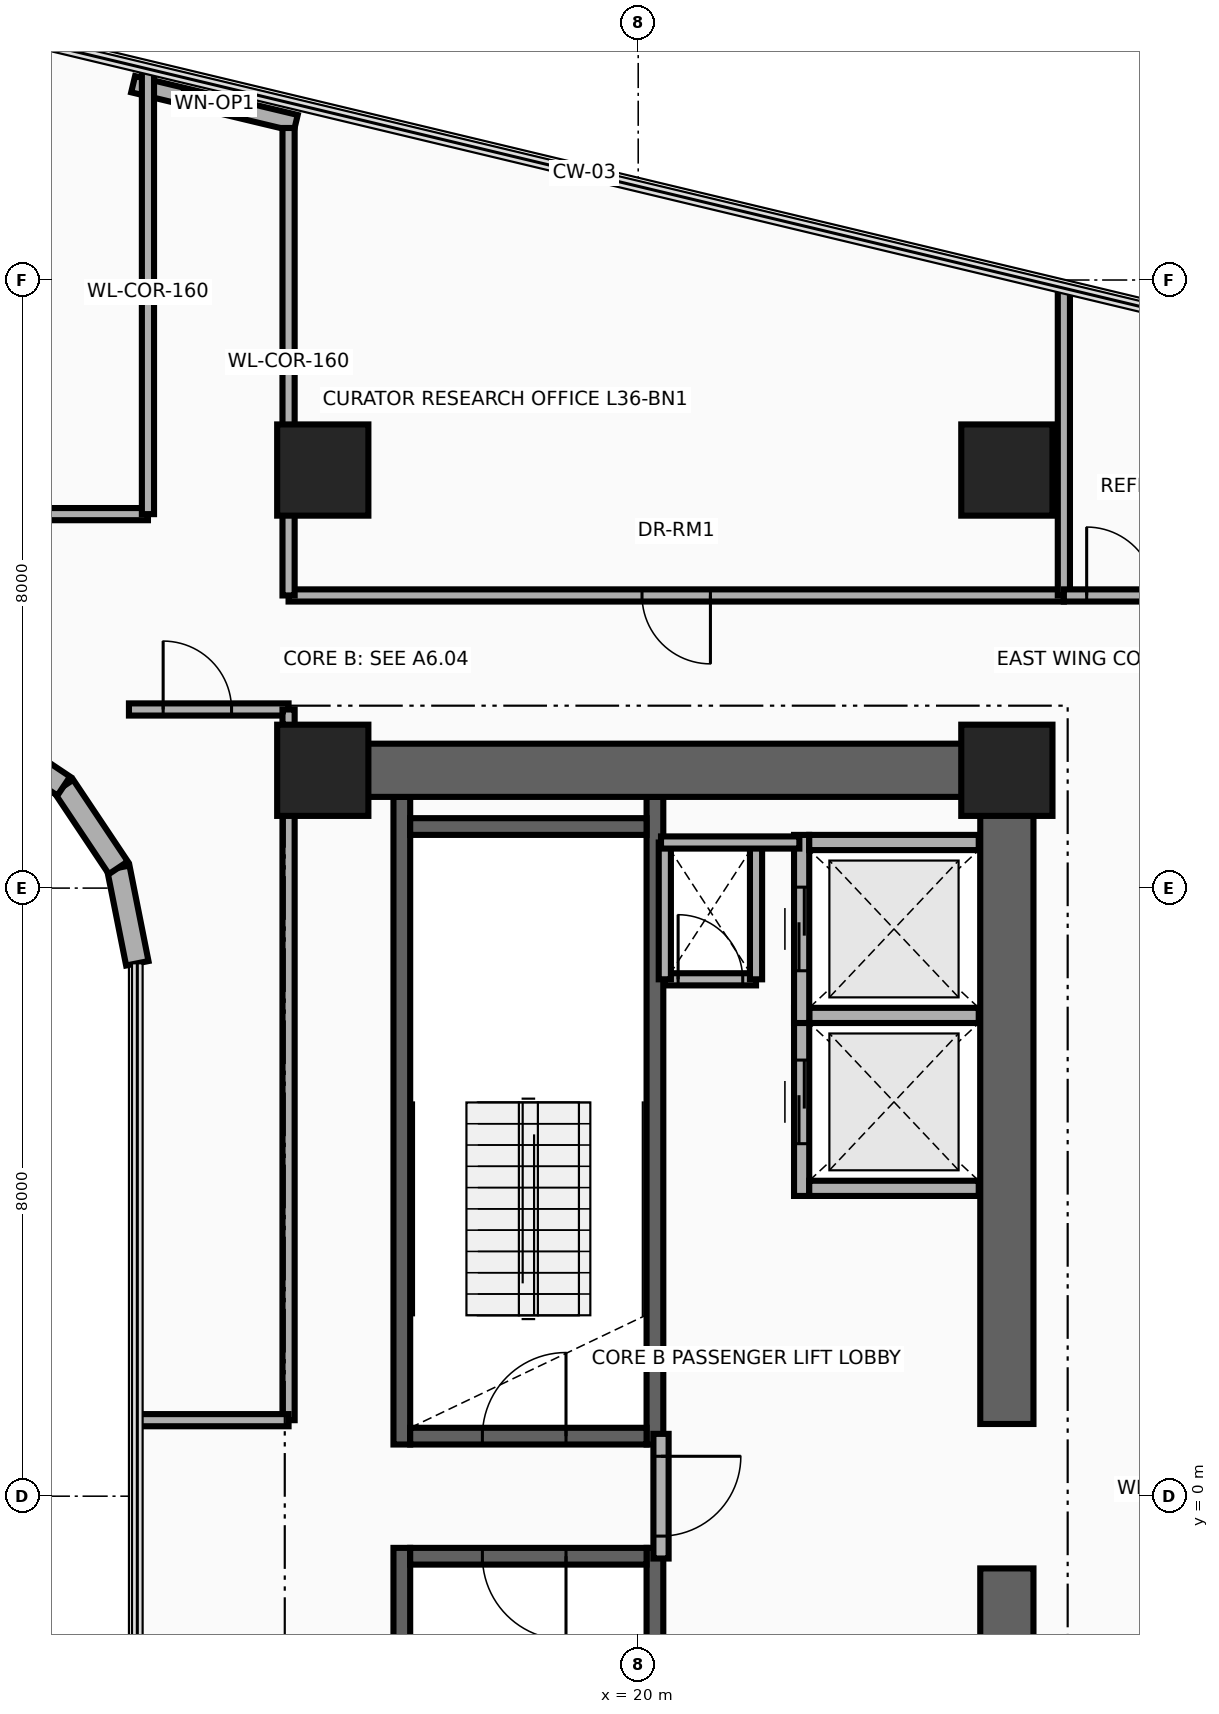
"""IFC4 building model, lengths in metres.
Left out: names, types, materials, properties, quantities, classifications, styles, units other than length and angle.
Written with IfcOpenShell. Run it as: python <this file> out.ifc"""

import sys

from ifc_helpers import new_model, si_unit, direction, frame, frame_2d, origin, origin_2d, place, context, subcontext, project, spatial, rectangle, extrude, source, transform, mapped, element, fill, save


model = new_model("IFC4")
c1 = context("Model", 3, precision=1e-05, world=origin(), true_north=direction((0.0, 1.0)))
c2 = subcontext(c1, "Body", "Model", "MODEL_VIEW")
j1 = project(units=[si_unit("LENGTHUNIT", "METRE"), si_unit("PLANEANGLEUNIT", "RADIAN")], contexts=[c1])
p1 = place(None, origin())
s1 = spatial("IfcSite", under=j1, at=p1, CompositionType="ELEMENT")
p2 = place(p1, origin())
s2 = spatial("IfcBuilding", under=s1, at=p2, CompositionType="ELEMENT")
p3 = place(p2, frame((0.0, 0.0, 142.7)))
s3 = spatial("IfcBuildingStorey", under=s2, at=p3, CompositionType="ELEMENT", Elevation=142.7)
for number, where, z_axis, x_axis in (
    (1, (16.89, 0.68, 0.0), (0.0, 0.0, 1.0), (0.0, 1.0, 0.0)),
    (2, (20.22, 0.68, 0.0), (0.0, 0.0, 1.0), (0.0, 1.0, 0.0)),
):
    element("IfcWall", number, at=place(p3, frame(where, z_axis=z_axis, x_axis=x_axis)), inside=s3, PredefinedType="SHEAR", context=c2, shape_type="SweptSolid", body=[
        extrude(rectangle(XDim=8.52, YDim=0.22, at=frame_2d((4.26, 0.0))), origin(), (0.0, 0.0, 1.0), 3.46),
    ])
p4 = place(p3, frame((17.0, 0.79, 0.0), z_axis=(0.0, 0.0, 1.0), x_axis=(1.0, 0.0, 0.0)))
e3 = element("IfcWall", 3, at=p4, inside=s3, PredefinedType="SHEAR", context=c2, shape_type="SweptSolid", body=[
    extrude(rectangle(XDim=3.11, YDim=0.22, at=frame_2d((1.555, 0.0))), origin(), (0.0, 0.0, 1.0), 3.46),
])
p5 = place(p4, frame((0.95, 0.0, 0.0)))
e4 = element("IfcOpeningElement", 4, at=p5, cuts=e3, PredefinedType="OPENING", context=c2, shape_type="SweptSolid", body=[
    extrude(rectangle(XDim=1.1, YDim=2.15, at=frame_2d((0.55, 1.075))), frame((0.0, 0.125, 0.0), z_axis=(0.0, -1.0, 0.0), x_axis=(1.0, 0.0, 0.0)), (0.0, 0.0, 1.0), 0.25),
])
p6 = place(p3, frame((17.0, 8.81, 0.0), z_axis=(0.0, 0.0, 1.0), x_axis=(1.0, 0.0, 0.0)))
e5 = element("IfcWall", 5, at=p6, inside=s3, PredefinedType="SHEAR", context=c2, shape_type="SweptSolid", body=[
    extrude(rectangle(XDim=3.11, YDim=0.22, at=frame_2d((1.555, 0.0))), origin(), (0.0, 0.0, 1.0), 3.46),
])
for number, where, z_axis, x_axis in (
    (6, (16.89, -9.2, 0.0), (0.0, 0.0, 1.0), (0.0, 1.0, 0.0)),
    (7, (20.22, -9.2, 0.0), (0.0, 0.0, 1.0), (0.0, 1.0, 0.0)),
):
    element("IfcWall", number, at=place(p3, frame(where, z_axis=z_axis, x_axis=x_axis)), inside=s3, PredefinedType="SHEAR", context=c2, shape_type="SweptSolid", body=[
        extrude(rectangle(XDim=8.52, YDim=0.22, at=frame_2d((4.26, 0.0))), origin(), (0.0, 0.0, 1.0), 3.46),
    ])
p7 = place(p3, frame((17.0, -0.79, 0.0), z_axis=(0.0, 0.0, 1.0), x_axis=(1.0, 0.0, 0.0)))
e8 = element("IfcWall", 8, at=p7, inside=s3, PredefinedType="SHEAR", context=c2, shape_type="SweptSolid", body=[
    extrude(rectangle(XDim=3.11, YDim=0.22, at=frame_2d((1.555, 0.0))), origin(), (0.0, 0.0, 1.0), 3.46),
])
p8 = place(p7, frame((0.95, 0.0, 0.0)))
e9 = element("IfcOpeningElement", 9, at=p8, cuts=e8, PredefinedType="OPENING", context=c2, shape_type="SweptSolid", body=[
    extrude(rectangle(XDim=1.1, YDim=2.15, at=frame_2d((0.55, 1.075))), frame((0.0, 0.125, 0.0), z_axis=(0.0, -1.0, 0.0), x_axis=(1.0, 0.0, 0.0)), (0.0, 0.0, 1.0), 0.25),
])
for number, where, z_axis, x_axis in (
    (10, (24.85, -9.9, 0.0), (0.0, 0.0, 1.0), (0.0, 1.0, 0.0)),
    (11, (24.85, 0.95, 0.0), (0.0, 0.0, 1.0), (0.0, 1.0, 0.0)),
):
    element("IfcWall", number, at=place(p3, frame(where, z_axis=z_axis, x_axis=x_axis)), inside=s3, PredefinedType="SHEAR", context=c2, shape_type="SweptSolid", body=[
        extrude(rectangle(XDim=8.95, YDim=0.7, at=frame_2d((4.475, 0.0))), origin(), (0.0, 0.0, 1.0), 3.46),
    ])
p9 = place(p3, frame((15.85, 9.55, 0.0), z_axis=(0.0, 0.0, 1.0), x_axis=(1.0, 0.0, 0.0)))
e12 = element("IfcWall", 12, at=p9, inside=s3, PredefinedType="SHEAR", context=c2, shape_type="SweptSolid", body=[
    extrude(rectangle(XDim=9.0, YDim=0.7, at=frame_2d((4.5, 0.0))), origin(), (0.0, 0.0, 1.0), 3.46),
])
m1 = source(origin(), c2, "Body", "SweptSolid", [
    extrude(rectangle(XDim=1.2, YDim=1.2, at=origin_2d()), origin(), (0.0, 0.0, 1.0), 3.7),
])
for number, where, z_axis, x_axis in (
    (13, (15.85, 9.55, 0.0), (0.0, 0.0, 1.0), (1.0, 0.0, 0.0)),
    (14, (24.85, 9.55, 0.0), (0.0, 0.0, 1.0), (1.0, 0.0, 0.0)),
    (15, (15.85, 13.5, 0.0), (0.0, 0.0, 1.0), (1.0, 0.0, 0.0)),
    (16, (24.85, 13.5, 0.0), (0.0, 0.0, 1.0), (1.0, 0.0, 0.0)),
):
    element("IfcColumn", number, at=place(p3, frame(where, z_axis=z_axis, x_axis=x_axis)), inside=s3, PredefinedType="COLUMN", context=c2, shape_type="MappedRepresentation", body=[
        mapped(m1, transform((0.0, 0.0, 0.0), x_axis=(1.0, 0.0, 0.0), y_axis=(0.0, 1.0, 0.0), z_axis=(0.0, 0.0, 1.0), scale=1.0)),
    ])
p10 = place(p3, frame((13.355, 18.576, 0.0), z_axis=(0.0, 0.0, 1.0), x_axis=(0.97252211384, -0.232810519721, 0.0)))
e17 = element("IfcWall", 17, at=p10, inside=s3, PredefinedType="SOLIDWALL", context=c2, shape_type="SweptSolid", body=[
    extrude(rectangle(XDim=2.2, YDim=0.22, at=frame_2d((1.1, 0.0))), origin(), (0.0, 0.0, 1.0), 3.46),
])
p11 = place(p10, frame((0.65, 0.0, 0.95)))
e18 = element("IfcOpeningElement", 18, at=p11, cuts=e17, PredefinedType="OPENING", context=c2, shape_type="SweptSolid", body=[
    extrude(rectangle(XDim=0.9, YDim=1.3, at=frame_2d((0.45, 0.65))), frame((0.0, 0.125, 0.0), z_axis=(0.0, -1.0, 0.0), x_axis=(1.0, 0.0, 0.0)), (0.0, 0.0, 1.0), 0.25),
])
p12 = place(p3, frame((13.41, 7.011, 0.0), z_axis=(0.0, 0.0, 1.0), x_axis=(-0.195090163074, 0.980785312019, 0.0)))
e19 = element("IfcWall", 19, at=p12, inside=s3, PredefinedType="SOLIDWALL", context=c2, shape_type="SweptSolid", body=[
    extrude(rectangle(XDim=1.281, YDim=0.3, at=frame_2d((0.641, 0.0))), origin(), (0.0, 0.0, 1.0), 3.46),
])
for number, where, z_axis, x_axis in (
    (20, (13.16, 8.268, 0.0), (0.0, 0.0, 1.0), (-0.556, 0.831, 0.0)),
    (21, (12.442, 9.342, 0.0), (0.0, 0.0, 1.0), (-0.831, 0.556, 0.0)),
):
    element("IfcWall", number, at=place(p3, frame(where, z_axis=z_axis, x_axis=x_axis)), inside=s3, PredefinedType="SOLIDWALL", context=c2, shape_type="SweptSolid", body=[
        extrude(rectangle(XDim=1.292, YDim=0.3, at=frame_2d((0.646, 0.0))), origin(), (0.0, 0.0, 1.0), 3.46),
    ])
p13 = place(p3, frame((22.15, 3.95, 0.0), z_axis=(0.0, 0.0, 1.0), x_axis=(0.0, 1.0, 0.0)))
e22 = element("IfcWall", 22, at=p13, inside=s3, PredefinedType="MOVABLE", context=c2, shape_type="SweptSolid", body=[
    extrude(rectangle(XDim=2.475, YDim=0.2, at=frame_2d((1.238, 0.0))), origin(), (0.0, 0.0, 1.0), 3.46),
])
p14 = place(p13, frame((0.688, 0.0, 0.0)))
e23 = element("IfcOpeningElement", 23, at=p14, cuts=e22, PredefinedType="OPENING", context=c2, shape_type="SweptSolid", body=[
    extrude(rectangle(XDim=1.1, YDim=2.1, at=frame_2d((0.55, 1.05))), frame((0.0, 0.115, 0.0), z_axis=(0.0, -1.0, 0.0), x_axis=(1.0, 0.0, 0.0)), (0.0, 0.0, 1.0), 0.23),
])
for number, where, z_axis, x_axis in (
    (24, (22.25, 4.05, 0.0), (0.0, 0.0, 1.0), (1.0, 0.0, 0.0)),
    (25, (22.25, 6.325, 0.0), (0.0, 0.0, 1.0), (1.0, 0.0, 0.0)),
):
    element("IfcWall", number, at=place(p3, frame(where, z_axis=z_axis, x_axis=x_axis)), inside=s3, PredefinedType="MOVABLE", context=c2, shape_type="SweptSolid", body=[
        extrude(rectangle(XDim=2.23, YDim=0.2, at=frame_2d((1.115, 0.0))), origin(), (0.0, 0.0, 1.0), 2.245),
    ])
p15 = place(p3, frame((22.15, 6.225, 0.0), z_axis=(0.0, 0.0, 1.0), x_axis=(0.0, 1.0, 0.0)))
e26 = element("IfcWall", 26, at=p15, inside=s3, PredefinedType="MOVABLE", context=c2, shape_type="SweptSolid", body=[
    extrude(rectangle(XDim=2.475, YDim=0.2, at=frame_2d((1.237, 0.0))), origin(), (0.0, 0.0, 1.0), 3.46),
])
p16 = place(p15, frame((0.688, 0.0, 0.0)))
e27 = element("IfcOpeningElement", 27, at=p16, cuts=e26, PredefinedType="OPENING", context=c2, shape_type="SweptSolid", body=[
    extrude(rectangle(XDim=1.1, YDim=2.1, at=frame_2d((0.55, 1.05))), frame((0.0, 0.115, 0.0), z_axis=(0.0, -1.0, 0.0), x_axis=(1.0, 0.0, 0.0)), (0.0, 0.0, 1.0), 0.23),
])
p17 = place(p3, frame((22.25, 8.6, 0.0), z_axis=(0.0, 0.0, 1.0), x_axis=(1.0, 0.0, 0.0)))
e28 = element("IfcWall", 28, at=p17, inside=s3, PredefinedType="MOVABLE", context=c2, shape_type="SweptSolid", body=[
    extrude(rectangle(XDim=2.23, YDim=0.2, at=frame_2d((1.115, 0.0))), origin(), (0.0, 0.0, 1.0), 2.245),
])
p18 = place(p3, frame((20.3, -0.82, 0.0), z_axis=(0.0, 0.0, 1.0), x_axis=(0.0, 1.0, 0.0)))
e29 = element("IfcWall", 29, at=p18, inside=s3, PredefinedType="PARTITIONING", context=c2, shape_type="SweptSolid", body=[
    extrude(rectangle(XDim=1.64, YDim=0.2, at=frame_2d((0.82, 0.0))), origin(), (0.0, 0.0, 1.0), 3.46),
])
p19 = place(p18, frame((0.295, 0.0, 0.0)))
e30 = element("IfcOpeningElement", 30, at=p19, cuts=e29, PredefinedType="OPENING", context=c2, shape_type="SweptSolid", body=[
    extrude(rectangle(XDim=1.05, YDim=2.15, at=frame_2d((0.525, 1.075))), frame((0.0, 0.115, 0.0), z_axis=(0.0, -1.0, 0.0), x_axis=(1.0, 0.0, 0.0)), (0.0, 0.0, 1.0), 0.23),
])
p20 = place(p3, frame((20.35, 6.8, 0.0), z_axis=(0.0, 0.0, 1.0), x_axis=(1.0, 0.0, 0.0)))
e31 = element("IfcWall", 31, at=p20, inside=s3, PredefinedType="PARTITIONING", context=c2, shape_type="SweptSolid", body=[
    extrude(rectangle(XDim=1.2, YDim=0.16, at=frame_2d((0.6, 0.0))), origin(), (0.0, 0.0, 1.0), 3.46),
])
p21 = place(p20, frame((0.175, 0.0, 0.0)))
e32 = element("IfcOpeningElement", 32, at=p21, cuts=e31, PredefinedType="OPENING", context=c2, shape_type="SweptSolid", body=[
    extrude(rectangle(XDim=0.85, YDim=2.05, at=frame_2d((0.425, 1.025))), frame((0.0, 0.095, 0.0), z_axis=(0.0, -1.0, 0.0), x_axis=(1.0, 0.0, 0.0)), (0.0, 0.0, 1.0), 0.19),
])
for number, where, z_axis, x_axis in (
    (33, (21.55, 6.8, 0.0), (0.0, 0.0, 1.0), (0.0, 1.0, 0.0)),
    (34, (20.35, 6.8, 0.0), (0.0, 0.0, 1.0), (0.0, 1.0, 0.0)),
):
    element("IfcWall", number, at=place(p3, frame(where, z_axis=z_axis, x_axis=x_axis)), inside=s3, PredefinedType="PARTITIONING", context=c2, shape_type="SweptSolid", body=[
        extrude(rectangle(XDim=1.8, YDim=0.16, at=frame_2d((0.9, 0.0))), origin(), (0.0, 0.0, 1.0), 3.46),
    ])
p22 = place(p3, frame((20.3, 8.6, 0.0), z_axis=(0.0, 0.0, 1.0), x_axis=(1.0, 0.0, 0.0)))
e35 = element("IfcWall", 35, at=p22, inside=s3, PredefinedType="PARTITIONING", context=c2, shape_type="SweptSolid", body=[
    extrude(rectangle(XDim=1.82, YDim=0.16, at=frame_2d((0.91, 0.0))), origin(), (0.0, 0.0, 1.0), 3.46),
])
p23 = place(p3, frame((-28.25, 12.92, 0.0), z_axis=(0.0, 0.0, 1.0), x_axis=(1.0, 0.0, 0.0)))
e36 = element("IfcWall", 36, at=p23, inside=s3, PredefinedType="PARTITIONING", context=c2, shape_type="SweptSolid", body=[
    extrude(rectangle(XDim=41.8, YDim=0.16, at=frame_2d((20.9, 0.0))), origin(), (0.0, 0.0, 1.0), 2.666),
])
p24 = place(p23, frame((4.0, 0.0, 0.0)))
e37 = element("IfcOpeningElement", 37, at=p24, cuts=e36, PredefinedType="OPENING", context=c2, shape_type="SweptSolid", body=[
    extrude(rectangle(XDim=0.9, YDim=2.1, at=frame_2d((0.45, 1.05))), frame((0.0, 0.095, 0.0), z_axis=(0.0, -1.0, 0.0), x_axis=(1.0, 0.0, 0.0)), (0.0, 0.0, 1.0), 0.19),
])
p25 = place(p23, frame((18.205, 0.0, 0.0)))
e38 = element("IfcOpeningElement", 38, at=p25, cuts=e36, PredefinedType="OPENING", context=c2, shape_type="SweptSolid", body=[
    extrude(rectangle(XDim=0.9, YDim=2.1, at=frame_2d((0.45, 1.05))), frame((0.0, 0.095, 0.0), z_axis=(0.0, -1.0, 0.0), x_axis=(1.0, 0.0, 0.0)), (0.0, 0.0, 1.0), 0.19),
])
p26 = place(p23, frame((33.635, 0.0, 0.0)))
e39 = element("IfcOpeningElement", 39, at=p26, cuts=e36, PredefinedType="OPENING", context=c2, shape_type="SweptSolid", body=[
    extrude(rectangle(XDim=0.9, YDim=2.1, at=frame_2d((0.45, 1.05))), frame((0.0, 0.095, 0.0), z_axis=(0.0, -1.0, 0.0), x_axis=(1.0, 0.0, 0.0)), (0.0, 0.0, 1.0), 0.19),
])
p27 = place(p3, frame((13.55, 12.92, 0.0), z_axis=(0.0, 0.0, 1.0), x_axis=(0.0, 1.0, 0.0)))
e40 = element("IfcWall", 40, at=p27, inside=s3, PredefinedType="PARTITIONING", context=c2, shape_type="SweptSolid", body=[
    extrude(rectangle(XDim=5.857, YDim=0.16, at=frame_2d((2.928, 0.0))), origin(), (0.0, 0.0, 1.0), 2.666),
])
p28 = place(p3, frame((15.4, 11.85, 0.0), z_axis=(0.0, 0.0, 1.0), x_axis=(1.0, 0.0, 0.0)))
e41 = element("IfcWall", 41, at=p28, inside=s3, PredefinedType="PARTITIONING", context=c2, shape_type="SweptSolid", body=[
    extrude(rectangle(XDim=10.2, YDim=0.16, at=frame_2d((5.1, 0.0))), origin(), (0.0, 0.0, 1.0), 2.834),
])
p29 = place(p28, frame((4.65, 0.0, 0.0)))
e42 = element("IfcOpeningElement", 42, at=p29, cuts=e41, PredefinedType="OPENING", context=c2, shape_type="SweptSolid", body=[
    extrude(rectangle(XDim=0.9, YDim=2.1, at=frame_2d((0.45, 1.05))), frame((0.0, 0.095, 0.0), z_axis=(0.0, -1.0, 0.0), x_axis=(1.0, 0.0, 0.0)), (0.0, 0.0, 1.0), 0.19),
])
p30 = place(p3, frame((15.4, 11.85, 0.0), z_axis=(0.0, 0.0, 1.0), x_axis=(0.0, 1.0, 0.0)))
e43 = element("IfcWall", 43, at=p30, inside=s3, PredefinedType="PARTITIONING", context=c2, shape_type="SweptSolid", body=[
    extrude(rectangle(XDim=6.15, YDim=0.16, at=frame_2d((3.075, 0.0))), origin(), (0.0, 0.0, 1.0), 2.666),
])
p31 = place(p3, frame((25.6, 11.85, 0.0), z_axis=(0.0, 0.0, 1.0), x_axis=(0.0, 1.0, 0.0)))
e44 = element("IfcWall", 44, at=p31, inside=s3, PredefinedType="PARTITIONING", context=c2, shape_type="SweptSolid", body=[
    extrude(rectangle(XDim=4.042, YDim=0.16, at=frame_2d((2.021, 0.0))), origin(), (0.0, 0.0, 1.0), 2.666),
])
p32 = place(p3, frame((25.6, 11.85, 0.0), z_axis=(0.0, 0.0, 1.0), x_axis=(1.0, 0.0, 0.0)))
e45 = element("IfcWall", 45, at=p32, inside=s3, PredefinedType="PARTITIONING", context=c2, shape_type="SweptSolid", body=[
    extrude(rectangle(XDim=4.09, YDim=0.16, at=frame_2d((2.045, 0.0))), origin(), (0.0, 0.0, 1.0), 2.896),
])
p33 = place(p32, frame((0.3, 0.0, 0.0)))
e46 = element("IfcOpeningElement", 46, at=p33, cuts=e45, PredefinedType="OPENING", context=c2, shape_type="SweptSolid", body=[
    extrude(rectangle(XDim=0.9, YDim=2.1, at=frame_2d((0.45, 1.05))), frame((0.0, 0.095, 0.0), z_axis=(0.0, -1.0, 0.0), x_axis=(1.0, 0.0, 0.0)), (0.0, 0.0, 1.0), 0.19),
])
p34 = place(p3, frame((13.3, 10.35, 0.0), z_axis=(0.0, 0.0, 1.0), x_axis=(1.0, 0.0, 0.0)))
e47 = element("IfcWall", 47, at=p34, inside=s3, PredefinedType="PARTITIONING", context=c2, shape_type="SweptSolid", body=[
    extrude(rectangle(XDim=2.1, YDim=0.16, at=frame_2d((1.05, 0.0))), origin(), (0.0, 0.0, 1.0), 2.666),
])
p35 = place(p34, frame((0.45, 0.0, 0.0)))
e48 = element("IfcOpeningElement", 48, at=p35, cuts=e47, PredefinedType="OPENING", context=c2, shape_type="SweptSolid", body=[
    extrude(rectangle(XDim=0.9, YDim=2.1, at=frame_2d((0.45, 1.05))), frame((0.0, 0.095, 0.0), z_axis=(0.0, -1.0, 0.0), x_axis=(1.0, 0.0, 0.0)), (0.0, 0.0, 1.0), 0.19),
])
p36 = place(p3, frame((15.4, 1.0, 0.0), z_axis=(0.0, 0.0, 1.0), x_axis=(0.0, 1.0, 0.0)))
e49 = element("IfcWall", 49, at=p36, inside=s3, PredefinedType="PARTITIONING", context=c2, shape_type="SweptSolid", body=[
    extrude(rectangle(XDim=9.35, YDim=0.16, at=frame_2d((4.675, 0.0))), origin(), (0.0, 0.0, 1.0), 2.245),
])
p37 = place(p3, frame((13.41, 1.0, 0.0), z_axis=(0.0, 0.0, 1.0), x_axis=(1.0, 0.0, 0.0)))
e50 = element("IfcWall", 50, at=p37, inside=s3, PredefinedType="PARTITIONING", context=c2, shape_type="SweptSolid", body=[
    extrude(rectangle(XDim=1.99, YDim=0.16, at=frame_2d((0.995, 0.0))), origin(), (0.0, 0.0, 1.0), 2.245),
])
p38 = place(p11, origin())
e51 = element("IfcWindow", 51, at=p38, inside=s3, PartitioningType="SINGLE_PANEL", PredefinedType="WINDOW", context=c2, shape_type="SweptSolid", body=[
    extrude(rectangle(XDim=0.9, YDim=1.3, at=frame_2d((0.45, 0.65))), frame((0.0, 0.03, 0.0), z_axis=(0.0, -1.0, 0.0), x_axis=(1.0, 0.0, 0.0)), (0.0, 0.0, 1.0), 0.06),
])
fill(e18, e51)
p39 = place(p14, origin())
e52 = element("IfcDoor", 52, at=p39, inside=s3, OperationType="DOUBLE_DOOR_SLIDING", PredefinedType="DOOR", context=c2, shape_type="SweptSolid", body=[
    extrude(rectangle(XDim=1.1, YDim=2.1, at=frame_2d((0.55, 1.05))), frame((0.0, 0.025, 0.0), z_axis=(0.0, -1.0, 0.0), x_axis=(1.0, 0.0, 0.0)), (0.0, 0.0, 1.0), 0.05),
])
fill(e23, e52)
p40 = place(p16, origin())
e53 = element("IfcDoor", 53, at=p40, inside=s3, OperationType="DOUBLE_DOOR_SLIDING", PredefinedType="DOOR", context=c2, shape_type="SweptSolid", body=[
    extrude(rectangle(XDim=1.1, YDim=2.1, at=frame_2d((0.55, 1.05))), frame((0.0, 0.025, 0.0), z_axis=(0.0, -1.0, 0.0), x_axis=(1.0, 0.0, 0.0)), (0.0, 0.0, 1.0), 0.05),
])
fill(e27, e53)
p41 = place(p19, frame((1.05, 0.0, 0.0), z_axis=(0.0, 0.0, 1.0), x_axis=(-1.0, 0.0, 0.0)))
e54 = element("IfcDoor", 54, at=p41, inside=s3, OperationType="SINGLE_SWING_LEFT", PredefinedType="DOOR", context=c2, shape_type="SweptSolid", body=[
    extrude(rectangle(XDim=1.05, YDim=2.15, at=frame_2d((0.525, 1.075))), frame((0.0, 0.025, 0.0), z_axis=(0.0, -1.0, 0.0), x_axis=(1.0, 0.0, 0.0)), (0.0, 0.0, 1.0), 0.05),
])
fill(e30, e54)
p42 = place(p5, origin())
e55 = element("IfcDoor", 55, at=p42, inside=s3, OperationType="SINGLE_SWING_RIGHT", PredefinedType="DOOR", context=c2, shape_type="SweptSolid", body=[
    extrude(rectangle(XDim=1.1, YDim=2.15, at=frame_2d((0.55, 1.075))), frame((0.0, 0.025, 0.0), z_axis=(0.0, -1.0, 0.0), x_axis=(1.0, 0.0, 0.0)), (0.0, 0.0, 1.0), 0.05),
])
fill(e4, e55)
p43 = place(p8, frame((1.1, 0.0, 0.0), z_axis=(0.0, 0.0, 1.0), x_axis=(-1.0, 0.0, 0.0)))
e56 = element("IfcDoor", 56, at=p43, inside=s3, OperationType="SINGLE_SWING_LEFT", PredefinedType="DOOR", context=c2, shape_type="SweptSolid", body=[
    extrude(rectangle(XDim=1.1, YDim=2.15, at=frame_2d((0.55, 1.075))), frame((0.0, 0.025, 0.0), z_axis=(0.0, -1.0, 0.0), x_axis=(1.0, 0.0, 0.0)), (0.0, 0.0, 1.0), 0.05),
])
fill(e9, e56)
p44 = place(p21, origin())
e57 = element("IfcDoor", 57, at=p44, inside=s3, OperationType="SINGLE_SWING_RIGHT", PredefinedType="DOOR", context=c2, shape_type="SweptSolid", body=[
    extrude(rectangle(XDim=0.85, YDim=2.05, at=frame_2d((0.425, 1.025))), frame((0.0, 0.025, 0.0), z_axis=(0.0, -1.0, 0.0), x_axis=(1.0, 0.0, 0.0)), (0.0, 0.0, 1.0), 0.05),
])
fill(e32, e57)
p45 = place(p29, frame((0.9, 0.0, 0.0), z_axis=(0.0, 0.0, 1.0), x_axis=(-1.0, 0.0, 0.0)))
e58 = element("IfcDoor", 58, at=p45, inside=s3, OperationType="SINGLE_SWING_LEFT", PredefinedType="DOOR", context=c2, shape_type="SweptSolid", body=[
    extrude(rectangle(XDim=0.9, YDim=2.1, at=frame_2d((0.45, 1.05))), frame((0.0, 0.025, 0.0), z_axis=(0.0, -1.0, 0.0), x_axis=(1.0, 0.0, 0.0)), (0.0, 0.0, 1.0), 0.05),
])
fill(e42, e58)
p46 = place(p33, origin())
e59 = element("IfcDoor", 59, at=p46, inside=s3, OperationType="SINGLE_SWING_LEFT", PredefinedType="DOOR", context=c2, shape_type="SweptSolid", body=[
    extrude(rectangle(XDim=0.9, YDim=2.1, at=frame_2d((0.45, 1.05))), frame((0.0, 0.025, 0.0), z_axis=(0.0, -1.0, 0.0), x_axis=(1.0, 0.0, 0.0)), (0.0, 0.0, 1.0), 0.05),
])
fill(e46, e59)
p47 = place(p35, origin())
e60 = element("IfcDoor", 60, at=p47, inside=s3, OperationType="SINGLE_SWING_RIGHT", PredefinedType="DOOR", context=c2, shape_type="SweptSolid", body=[
    extrude(rectangle(XDim=0.9, YDim=2.1, at=frame_2d((0.45, 1.05))), frame((0.0, 0.025, 0.0), z_axis=(0.0, -1.0, 0.0), x_axis=(1.0, 0.0, 0.0)), (0.0, 0.0, 1.0), 0.05),
])
fill(e48, e60)
save(model, sys.argv[1])
